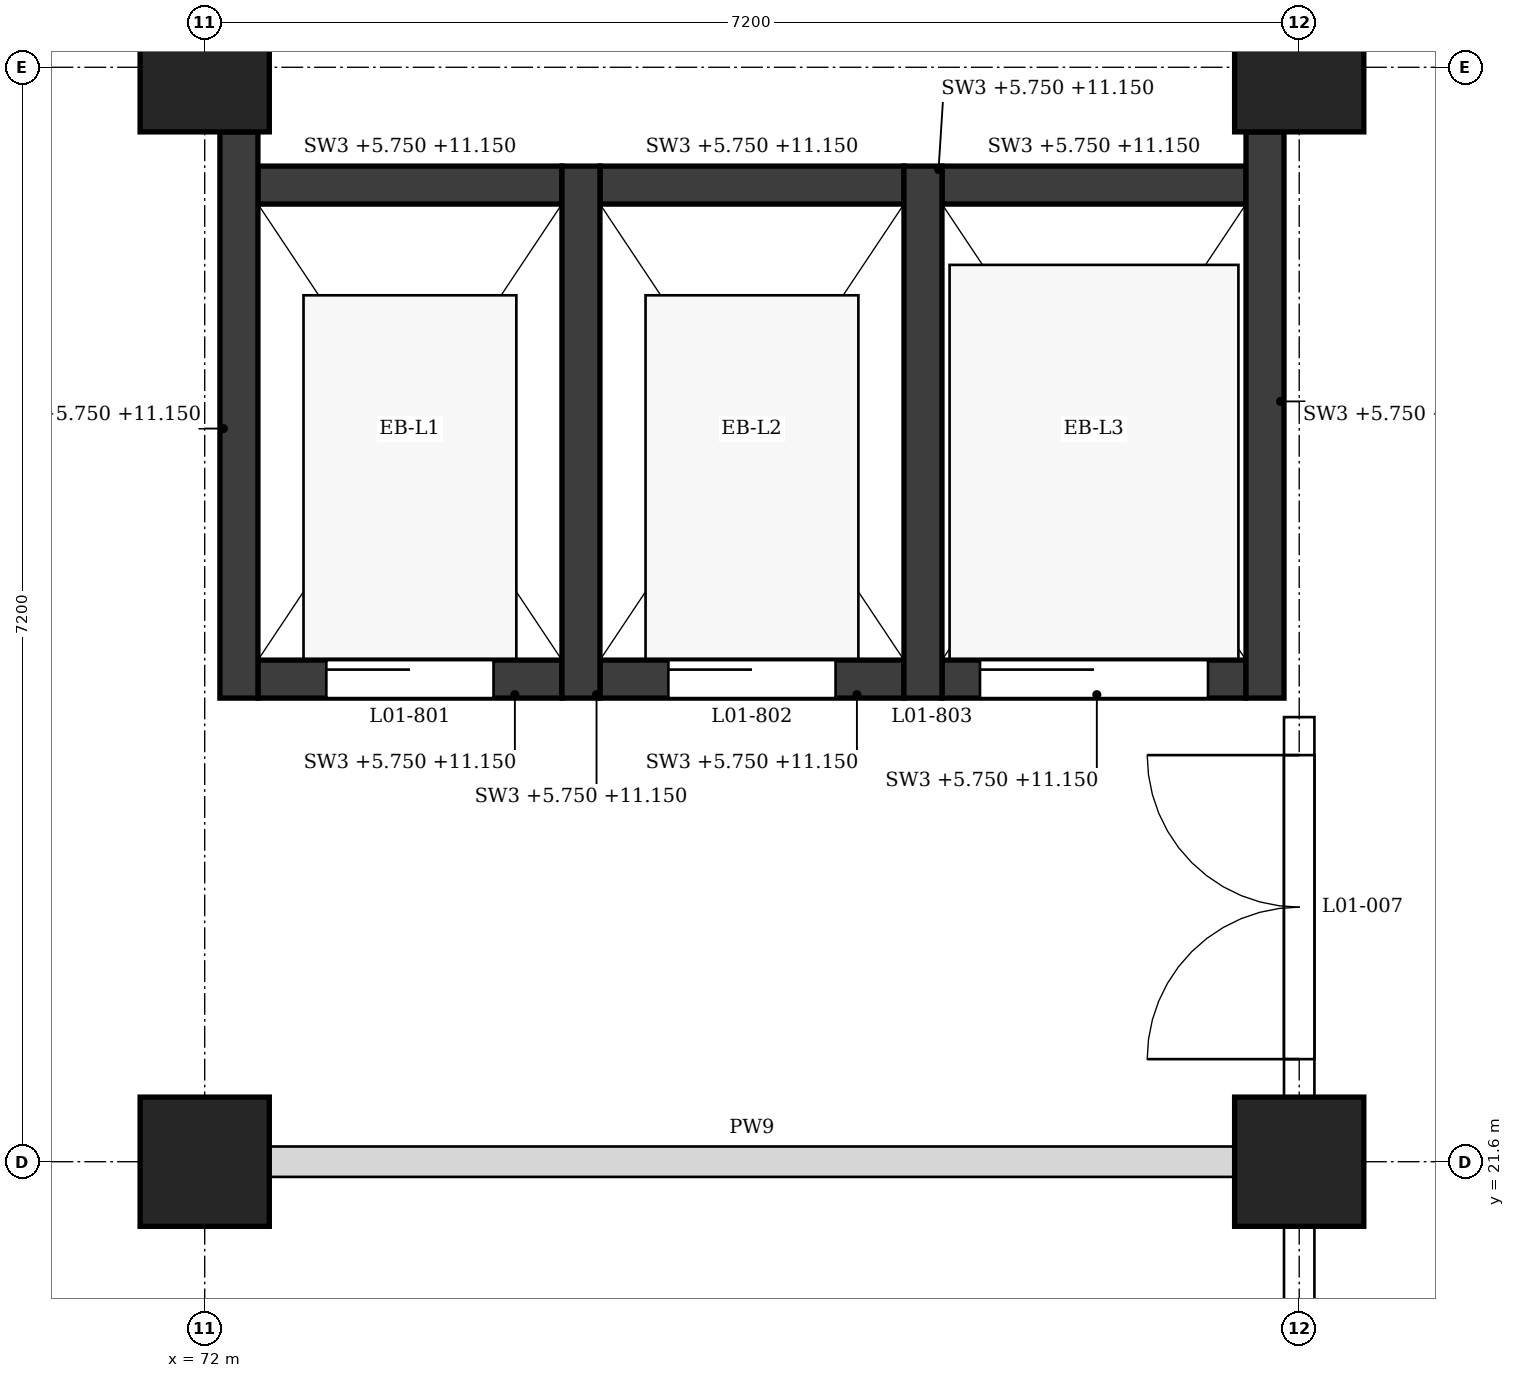
"""IFC4 building model, lengths in metres.
Left out: names, types, materials, properties, quantities, classifications, styles, units other than length and angle.
Written with IfcOpenShell. Run it as: python <this file> out.ifc"""

import sys

from ifc_helpers import new_model, si_unit, direction, frame, frame_2d, origin, origin_2d, place, context, subcontext, project, spatial, rectangle, extrude, element, fill, save


model = new_model("IFC4")
c1 = context("Model", 3, precision=1e-05, world=origin(), true_north=direction((0.0, 1.0)))
c2 = subcontext(c1, "Body", "Model", "MODEL_VIEW")
j1 = project(units=[si_unit("LENGTHUNIT", "METRE"), si_unit("PLANEANGLEUNIT", "RADIAN")], contexts=[c1])
p1 = place(None, origin())
s1 = spatial("IfcSite", under=j1, at=p1, CompositionType="ELEMENT")
p2 = place(p1, origin())
s2 = spatial("IfcBuilding", under=s1, at=p2, CompositionType="ELEMENT")
p3 = place(p2, frame((0.0, 0.0, 6.0)))
s3 = spatial("IfcBuildingStorey", under=s2, at=p3, CompositionType="ELEMENT", Elevation=6.0)
for number, where, z_axis, x_axis in (
    (1, (72.0, 21.6, 0.0), (0.0, 0.0, 1.0), (1.0, 0.0, 0.0)),
    (2, (72.0, 28.8, 0.0), (0.0, 0.0, 1.0), (1.0, 0.0, 0.0)),
    (3, (79.2, 21.6, 0.0), (0.0, 0.0, 1.0), (1.0, 0.0, 0.0)),
    (4, (79.2, 28.8, 0.0), (0.0, 0.0, 1.0), (1.0, 0.0, 0.0)),
):
    element("IfcColumn", number, at=place(p3, frame(where, z_axis=z_axis, x_axis=x_axis)), inside=s3, PredefinedType="COLUMN", context=c2, shape_type="SweptSolid", body=[
        extrude(rectangle(XDim=0.85, YDim=0.85, at=origin_2d()), origin(), (0.0, 0.0, 1.0), 5.4),
    ])
p4 = place(p3, frame((72.225, 24.65, -0.25), z_axis=(0.0, 0.0, 1.0), x_axis=(0.0, 1.0, 0.0)))
e5 = element("IfcWall", 5, at=p4, inside=s3, PredefinedType="SHEAR", context=c2, shape_type="SweptSolid", body=[
    extrude(rectangle(XDim=3.725, YDim=0.25, at=frame_2d((1.863, 0.0))), origin(), (0.0, 0.0, 1.0), 5.4),
])
for number, where, z_axis, x_axis in (
    (6, (74.475, 24.65, -0.25), (0.0, 0.0, 1.0), (0.0, 1.0, 0.0)),
    (7, (76.725, 24.65, -0.25), (0.0, 0.0, 1.0), (0.0, 1.0, 0.0)),
):
    element("IfcWall", number, at=place(p3, frame(where, z_axis=z_axis, x_axis=x_axis)), inside=s3, PredefinedType="SHEAR", context=c2, shape_type="SweptSolid", body=[
        extrude(rectangle(XDim=3.5, YDim=0.25, at=frame_2d((1.75, 0.0))), origin(), (0.0, 0.0, 1.0), 5.4),
    ])
p5 = place(p3, frame((78.975, 24.65, -0.25), z_axis=(0.0, 0.0, 1.0), x_axis=(0.0, 1.0, 0.0)))
e8 = element("IfcWall", 8, at=p5, inside=s3, PredefinedType="SHEAR", context=c2, shape_type="SweptSolid", body=[
    extrude(rectangle(XDim=3.725, YDim=0.25, at=frame_2d((1.863, 0.0))), origin(), (0.0, 0.0, 1.0), 5.4),
])
p6 = place(p3, frame((72.35, 24.775, -0.25), z_axis=(0.0, 0.0, 1.0), x_axis=(1.0, 0.0, 0.0)))
e9 = element("IfcWall", 9, at=p6, inside=s3, PredefinedType="SHEAR", context=c2, shape_type="SweptSolid", body=[
    extrude(rectangle(XDim=2.0, YDim=0.25, at=frame_2d((1.0, 0.0))), origin(), (0.0, 0.0, 1.0), 5.4),
])
p7 = place(p6, frame((0.45, 0.0, 0.25)))
e10 = element("IfcOpeningElement", 10, at=p7, cuts=e9, PredefinedType="OPENING", context=c2, shape_type="SweptSolid", body=[
    extrude(rectangle(XDim=1.1, YDim=2.1, at=frame_2d((0.55, 1.05))), frame((0.0, 0.135, 0.0), z_axis=(0.0, -1.0, 0.0), x_axis=(1.0, 0.0, 0.0)), (0.0, 0.0, 1.0), 0.27),
])
p8 = place(p3, frame((72.35, 28.025, -0.25), z_axis=(0.0, 0.0, 1.0), x_axis=(1.0, 0.0, 0.0)))
e11 = element("IfcWall", 11, at=p8, inside=s3, PredefinedType="SHEAR", context=c2, shape_type="SweptSolid", body=[
    extrude(rectangle(XDim=2.0, YDim=0.25, at=frame_2d((1.0, 0.0))), origin(), (0.0, 0.0, 1.0), 5.4),
])
p9 = place(p3, frame((74.6, 24.775, -0.25), z_axis=(0.0, 0.0, 1.0), x_axis=(1.0, 0.0, 0.0)))
e12 = element("IfcWall", 12, at=p9, inside=s3, PredefinedType="SHEAR", context=c2, shape_type="SweptSolid", body=[
    extrude(rectangle(XDim=2.0, YDim=0.25, at=frame_2d((1.0, 0.0))), origin(), (0.0, 0.0, 1.0), 5.4),
])
p10 = place(p9, frame((0.45, 0.0, 0.25)))
e13 = element("IfcOpeningElement", 13, at=p10, cuts=e12, PredefinedType="OPENING", context=c2, shape_type="SweptSolid", body=[
    extrude(rectangle(XDim=1.1, YDim=2.1, at=frame_2d((0.55, 1.05))), frame((0.0, 0.135, 0.0), z_axis=(0.0, -1.0, 0.0), x_axis=(1.0, 0.0, 0.0)), (0.0, 0.0, 1.0), 0.27),
])
p11 = place(p3, frame((74.6, 28.025, -0.25), z_axis=(0.0, 0.0, 1.0), x_axis=(1.0, 0.0, 0.0)))
e14 = element("IfcWall", 14, at=p11, inside=s3, PredefinedType="SHEAR", context=c2, shape_type="SweptSolid", body=[
    extrude(rectangle(XDim=2.0, YDim=0.25, at=frame_2d((1.0, 0.0))), origin(), (0.0, 0.0, 1.0), 5.4),
])
p12 = place(p3, frame((76.85, 24.775, -0.25), z_axis=(0.0, 0.0, 1.0), x_axis=(1.0, 0.0, 0.0)))
e15 = element("IfcWall", 15, at=p12, inside=s3, PredefinedType="SHEAR", context=c2, shape_type="SweptSolid", body=[
    extrude(rectangle(XDim=2.0, YDim=0.25, at=frame_2d((1.0, 0.0))), origin(), (0.0, 0.0, 1.0), 5.4),
])
p13 = place(p12, frame((0.25, 0.0, 0.25)))
e16 = element("IfcOpeningElement", 16, at=p13, cuts=e15, PredefinedType="OPENING", context=c2, shape_type="SweptSolid", body=[
    extrude(rectangle(XDim=1.5, YDim=2.1, at=frame_2d((0.75, 1.05))), frame((0.0, 0.135, 0.0), z_axis=(0.0, -1.0, 0.0), x_axis=(1.0, 0.0, 0.0)), (0.0, 0.0, 1.0), 0.27),
])
p14 = place(p3, frame((76.85, 28.025, -0.25), z_axis=(0.0, 0.0, 1.0), x_axis=(1.0, 0.0, 0.0)))
e17 = element("IfcWall", 17, at=p14, inside=s3, PredefinedType="SHEAR", context=c2, shape_type="SweptSolid", body=[
    extrude(rectangle(XDim=2.0, YDim=0.25, at=frame_2d((1.0, 0.0))), origin(), (0.0, 0.0, 1.0), 5.4),
])
p15 = place(p2, origin())
s4 = spatial("IfcBuildingStorey", under=s2, at=p15, CompositionType="ELEMENT", Elevation=0.0)
for number, where, z_axis, x_axis in (
    (18, (65.225, 21.4, 0.0), (0.0, 0.0, 1.0), (1.0, 0.0, 0.0)),
    (19, (65.225, 21.8, 0.0), (0.0, 0.0, 1.0), (1.0, 0.0, 0.0)),
):
    element("IfcWall", number, at=place(p15, frame(where, z_axis=z_axis, x_axis=x_axis)), inside=s4, PredefinedType="SOLIDWALL", context=c2, shape_type="SweptSolid", body=[
        extrude(rectangle(XDim=6.35, YDim=0.4, at=frame_2d((3.175, 0.0))), origin(), (0.0, 0.0, 1.0), 10.7),
    ])
for number, where, z_axis, x_axis in (
    (20, (71.8, 14.825, 0.0), (0.0, 0.0, 1.0), (0.0, 1.0, 0.0)),
    (21, (71.8, 22.025, 0.0), (0.0, 0.0, 1.0), (0.0, 1.0, 0.0)),
):
    element("IfcWall", number, at=place(p15, frame(where, z_axis=z_axis, x_axis=x_axis)), inside=s4, PredefinedType="SOLIDWALL", context=c2, shape_type="SweptSolid", body=[
        extrude(rectangle(XDim=6.35, YDim=0.4, at=frame_2d((3.175, 0.0))), origin(), (0.0, 0.0, 1.0), 10.55),
    ])
p16 = place(p3, frame((72.425, 21.6, 0.0), z_axis=(0.0, 0.0, 1.0), x_axis=(1.0, 0.0, 0.0)))
e22 = element("IfcWall", 22, at=p16, inside=s3, PredefinedType="PARTITIONING", context=c2, shape_type="SweptSolid", body=[
    extrude(rectangle(XDim=6.35, YDim=0.2, at=frame_2d((3.175, 0.0))), origin(), (0.0, 0.0, 1.0), 4.4),
])
p17 = place(p3, frame((79.2, 14.825, 0.0), z_axis=(0.0, 0.0, 1.0), x_axis=(0.0, 1.0, 0.0)))
e23 = element("IfcWall", 23, at=p17, inside=s3, PredefinedType="PARTITIONING", context=c2, shape_type="SweptSolid", body=[
    extrude(rectangle(XDim=6.35, YDim=0.2, at=frame_2d((3.175, 0.0))), origin(), (0.0, 0.0, 1.0), 4.4),
])
p18 = place(p17, frame((2.675, 0.0, 0.0)))
e24 = element("IfcOpeningElement", 24, at=p18, cuts=e23, PredefinedType="OPENING", context=c2, shape_type="SweptSolid", body=[
    extrude(rectangle(XDim=1.0, YDim=2.1, at=frame_2d((0.5, 1.05))), frame((0.0, 0.11, 0.0), z_axis=(0.0, -1.0, 0.0), x_axis=(1.0, 0.0, 0.0)), (0.0, 0.0, 1.0), 0.22),
])
p19 = place(p3, frame((79.2, 22.025, 0.0), z_axis=(0.0, 0.0, 1.0), x_axis=(0.0, 1.0, 0.0)))
e25 = element("IfcWall", 25, at=p19, inside=s3, PredefinedType="PARTITIONING", context=c2, shape_type="SweptSolid", body=[
    extrude(rectangle(XDim=2.5, YDim=0.2, at=frame_2d((1.25, 0.0))), origin(), (0.0, 0.0, 1.0), 4.4),
])
p20 = place(p19, frame((0.25, 0.0, 0.0)))
e26 = element("IfcOpeningElement", 26, at=p20, cuts=e25, PredefinedType="OPENING", context=c2, shape_type="SweptSolid", body=[
    extrude(rectangle(XDim=2.0, YDim=2.4, at=frame_2d((1.0, 1.2))), frame((0.0, 0.11, 0.0), z_axis=(0.0, -1.0, 0.0), x_axis=(1.0, 0.0, 0.0)), (0.0, 0.0, 1.0), 0.22),
])
p21 = place(p7, origin())
e27 = element("IfcDoor", 27, at=p21, inside=s3, OperationType="SLIDING_TO_LEFT", PredefinedType="DOOR", context=c2, shape_type="SweptSolid", body=[
    extrude(rectangle(XDim=1.1, YDim=2.1, at=frame_2d((0.55, 1.05))), frame((0.0, 0.025, 0.0), z_axis=(0.0, -1.0, 0.0), x_axis=(1.0, 0.0, 0.0)), (0.0, 0.0, 1.0), 0.05),
])
fill(e10, e27)
p22 = place(p10, origin())
e28 = element("IfcDoor", 28, at=p22, inside=s3, OperationType="SLIDING_TO_LEFT", PredefinedType="DOOR", context=c2, shape_type="SweptSolid", body=[
    extrude(rectangle(XDim=1.1, YDim=2.1, at=frame_2d((0.55, 1.05))), frame((0.0, 0.025, 0.0), z_axis=(0.0, -1.0, 0.0), x_axis=(1.0, 0.0, 0.0)), (0.0, 0.0, 1.0), 0.05),
])
fill(e13, e28)
p23 = place(p13, origin())
e29 = element("IfcDoor", 29, at=p23, inside=s3, OperationType="SLIDING_TO_LEFT", PredefinedType="DOOR", context=c2, shape_type="SweptSolid", body=[
    extrude(rectangle(XDim=1.5, YDim=2.1, at=frame_2d((0.75, 1.05))), frame((0.0, 0.025, 0.0), z_axis=(0.0, -1.0, 0.0), x_axis=(1.0, 0.0, 0.0)), (0.0, 0.0, 1.0), 0.05),
])
fill(e16, e29)
p24 = place(p20, origin())
e30 = element("IfcDoor", 30, at=p24, inside=s3, OperationType="DOUBLE_DOOR_SINGLE_SWING", PredefinedType="DOOR", context=c2, shape_type="SweptSolid", body=[
    extrude(rectangle(XDim=2.0, YDim=2.4, at=frame_2d((1.0, 1.2))), frame((0.0, 0.025, 0.0), z_axis=(0.0, -1.0, 0.0), x_axis=(1.0, 0.0, 0.0)), (0.0, 0.0, 1.0), 0.05),
])
fill(e26, e30)
save(model, sys.argv[1])
